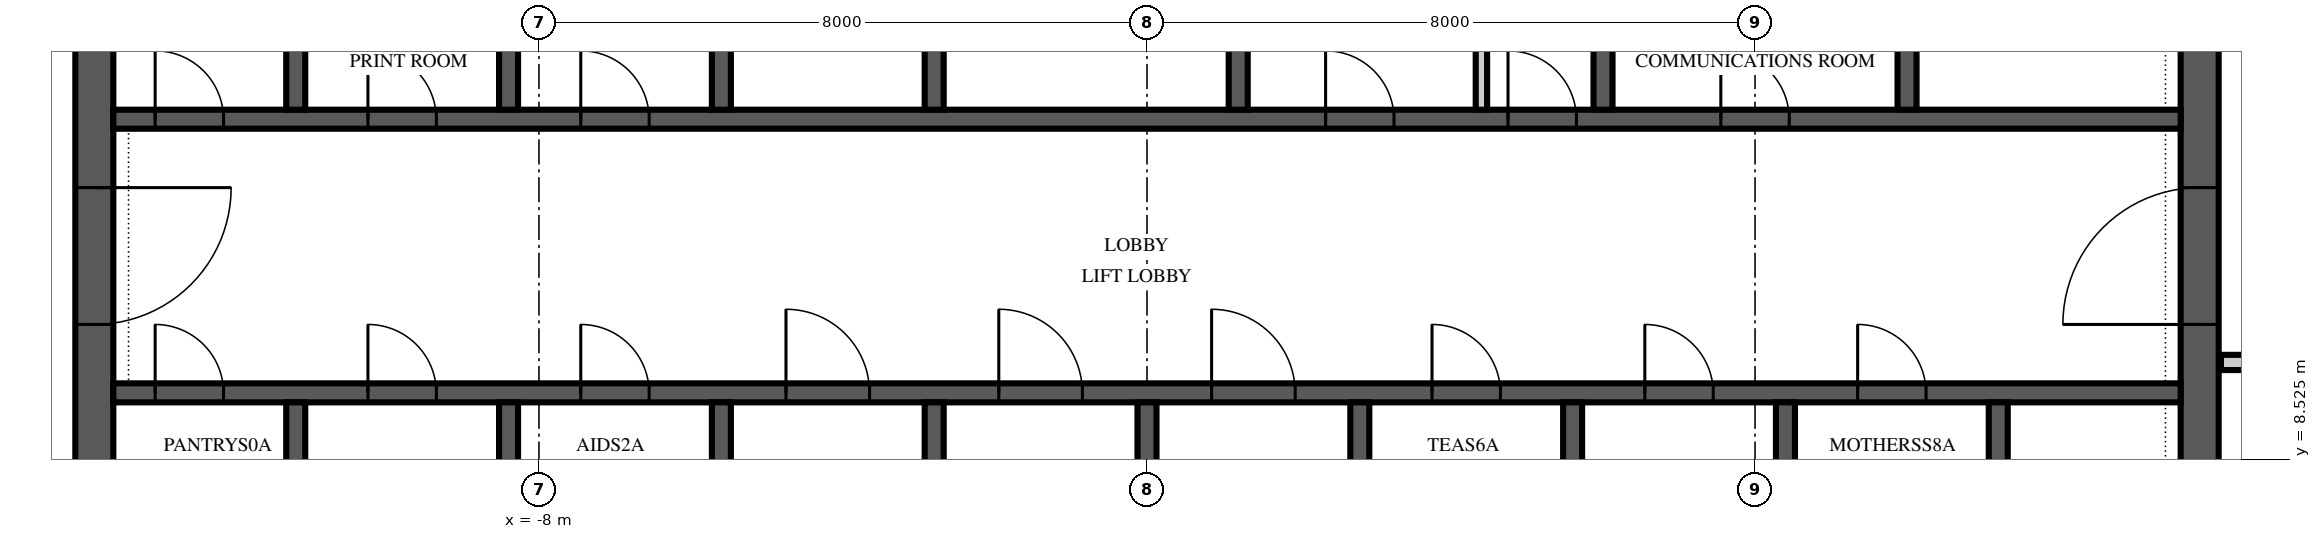
"""IFC4 building model, lengths in metres.
Left out: names, types, materials, properties, quantities, classifications, styles, units other than length and angle.
Written with IfcOpenShell. Run it as: python <this file> out.ifc"""

import sys

from ifc_helpers import new_model, si_unit, direction, frame, frame_2d, origin, place, context, subcontext, project, spatial, polyline, rectangle, outline, extrude, element, fill, save


model = new_model("IFC4")
c1 = context("Model", 3, precision=1e-05, world=origin(), true_north=direction((0.0, 1.0)))
c2 = subcontext(c1, "Body", "Model", "MODEL_VIEW")
j1 = project(units=[si_unit("LENGTHUNIT", "METRE"), si_unit("PLANEANGLEUNIT", "RADIAN")], contexts=[c1])
p1 = place(None, origin())
s1 = spatial("IfcSite", under=j1, at=p1, CompositionType="ELEMENT")
p2 = place(p1, origin())
s2 = spatial("IfcBuilding", under=s1, at=p2, CompositionType="ELEMENT")
p3 = place(p2, frame((0.0, 0.0, 312.0)))
s3 = spatial("IfcBuildingStorey", under=s2, at=p3, CompositionType="ELEMENT", Elevation=312.0)
p4 = place(p3, frame((13.85, 6.15, 0.0), z_axis=(0.0, 0.0, 1.0), x_axis=(0.0, 1.0, 0.0)))
e1 = element("IfcWall", 1, at=p4, inside=s3, PredefinedType="SHEAR", context=c2, shape_type="SweptSolid", body=[
    extrude(outline(polyline([(0.0, -0.25), (17.7, -0.25), (17.7, 0.0), (17.45, 0.0), (17.45, 0.25), (0.25, 0.25), (0.25, 0.0), (0.0, 0.0), (0.0, -0.25)])), origin(), (0.0, 0.0, 1.0), 4.0),
])
p5 = place(p4, frame((4.15, 0.0, 0.0)))
e2 = element("IfcOpeningElement", 2, at=p5, cuts=e1, PredefinedType="OPENING", context=c2, shape_type="SweptSolid", body=[
    extrude(rectangle(XDim=1.8, YDim=2.4, at=frame_2d((0.9, 1.2))), frame((0.0, 0.265, 0.0), z_axis=(0.0, -1.0, 0.0), x_axis=(1.0, 0.0, 0.0)), (0.0, 0.0, 1.0), 0.53),
])
p6 = place(p3, frame((-13.85, 23.85, 0.0), z_axis=(0.0, 0.0, 1.0), x_axis=(0.0, -1.0, 0.0)))
e3 = element("IfcWall", 3, at=p6, inside=s3, PredefinedType="SHEAR", context=c2, shape_type="SweptSolid", body=[
    extrude(outline(polyline([(0.0, -0.25), (17.7, -0.25), (17.7, 0.0), (17.45, 0.0), (17.45, 0.25), (0.25, 0.25), (0.25, 0.0), (0.0, 0.0), (0.0, -0.25)])), origin(), (0.0, 0.0, 1.0), 4.0),
])
p7 = place(p6, frame((11.75, 0.0, 0.0)))
e4 = element("IfcOpeningElement", 4, at=p7, cuts=e3, PredefinedType="OPENING", context=c2, shape_type="SweptSolid", body=[
    extrude(rectangle(XDim=1.8, YDim=2.4, at=frame_2d((0.9, 1.2))), frame((0.0, 0.265, 0.0), z_axis=(0.0, -1.0, 0.0), x_axis=(1.0, 0.0, 0.0)), (0.0, 0.0, 1.0), 0.53),
])
p8 = place(p3, frame((-13.6, 9.4, 0.0), z_axis=(0.0, 0.0, 1.0), x_axis=(1.0, 0.0, 0.0)))
e5 = element("IfcWall", 5, at=p8, inside=s3, PredefinedType="SHEAR", context=c2, shape_type="SweptSolid", body=[
    extrude(rectangle(XDim=27.2, YDim=0.25, at=frame_2d((13.6, 0.0))), origin(), (0.0, 0.0, 1.0), 4.0),
])
p9 = place(p8, frame((8.85, 0.0, 0.0)))
e6 = element("IfcOpeningElement", 6, at=p9, cuts=e5, PredefinedType="OPENING", context=c2, shape_type="SweptSolid", body=[
    extrude(rectangle(XDim=1.1, YDim=2.1, at=frame_2d((0.55, 1.05))), frame((0.0, 0.14, 0.0), z_axis=(0.0, -1.0, 0.0), x_axis=(1.0, 0.0, 0.0)), (0.0, 0.0, 1.0), 0.28),
])
p10 = place(p8, frame((11.65, 0.0, 0.0)))
e7 = element("IfcOpeningElement", 7, at=p10, cuts=e5, PredefinedType="OPENING", context=c2, shape_type="SweptSolid", body=[
    extrude(rectangle(XDim=1.1, YDim=2.1, at=frame_2d((0.55, 1.05))), frame((0.0, 0.14, 0.0), z_axis=(0.0, -1.0, 0.0), x_axis=(1.0, 0.0, 0.0)), (0.0, 0.0, 1.0), 0.28),
])
p11 = place(p8, frame((14.45, 0.0, 0.0)))
e8 = element("IfcOpeningElement", 8, at=p11, cuts=e5, PredefinedType="OPENING", context=c2, shape_type="SweptSolid", body=[
    extrude(rectangle(XDim=1.1, YDim=2.1, at=frame_2d((0.55, 1.05))), frame((0.0, 0.14, 0.0), z_axis=(0.0, -1.0, 0.0), x_axis=(1.0, 0.0, 0.0)), (0.0, 0.0, 1.0), 0.28),
])
p12 = place(p8, frame((0.55, 0.0, 0.0)))
e9 = element("IfcOpeningElement", 9, at=p12, cuts=e5, PredefinedType="OPENING", context=c2, shape_type="SweptSolid", body=[
    extrude(rectangle(XDim=0.9, YDim=2.1, at=frame_2d((0.45, 1.05))), frame((0.0, 0.14, 0.0), z_axis=(0.0, -1.0, 0.0), x_axis=(1.0, 0.0, 0.0)), (0.0, 0.0, 1.0), 0.28),
])
p13 = place(p8, frame((3.35, 0.0, 0.0)))
e10 = element("IfcOpeningElement", 10, at=p13, cuts=e5, PredefinedType="OPENING", context=c2, shape_type="SweptSolid", body=[
    extrude(rectangle(XDim=0.9, YDim=2.1, at=frame_2d((0.45, 1.05))), frame((0.0, 0.14, 0.0), z_axis=(0.0, -1.0, 0.0), x_axis=(1.0, 0.0, 0.0)), (0.0, 0.0, 1.0), 0.28),
])
p14 = place(p8, frame((6.15, 0.0, 0.0)))
e11 = element("IfcOpeningElement", 11, at=p14, cuts=e5, PredefinedType="OPENING", context=c2, shape_type="SweptSolid", body=[
    extrude(rectangle(XDim=0.9, YDim=2.1, at=frame_2d((0.45, 1.05))), frame((0.0, 0.14, 0.0), z_axis=(0.0, -1.0, 0.0), x_axis=(1.0, 0.0, 0.0)), (0.0, 0.0, 1.0), 0.28),
])
p15 = place(p8, frame((17.35, 0.0, 0.0)))
e12 = element("IfcOpeningElement", 12, at=p15, cuts=e5, PredefinedType="OPENING", context=c2, shape_type="SweptSolid", body=[
    extrude(rectangle(XDim=0.9, YDim=2.1, at=frame_2d((0.45, 1.05))), frame((0.0, 0.14, 0.0), z_axis=(0.0, -1.0, 0.0), x_axis=(1.0, 0.0, 0.0)), (0.0, 0.0, 1.0), 0.28),
])
p16 = place(p8, frame((20.15, 0.0, 0.0)))
e13 = element("IfcOpeningElement", 13, at=p16, cuts=e5, PredefinedType="OPENING", context=c2, shape_type="SweptSolid", body=[
    extrude(rectangle(XDim=0.9, YDim=2.1, at=frame_2d((0.45, 1.05))), frame((0.0, 0.14, 0.0), z_axis=(0.0, -1.0, 0.0), x_axis=(1.0, 0.0, 0.0)), (0.0, 0.0, 1.0), 0.28),
])
p17 = place(p8, frame((22.95, 0.0, 0.0)))
e14 = element("IfcOpeningElement", 14, at=p17, cuts=e5, PredefinedType="OPENING", context=c2, shape_type="SweptSolid", body=[
    extrude(rectangle(XDim=0.9, YDim=2.1, at=frame_2d((0.45, 1.05))), frame((0.0, 0.14, 0.0), z_axis=(0.0, -1.0, 0.0), x_axis=(1.0, 0.0, 0.0)), (0.0, 0.0, 1.0), 0.28),
])
p18 = place(p3, frame((-13.6, 13.0, 0.0), z_axis=(0.0, 0.0, 1.0), x_axis=(1.0, 0.0, 0.0)))
e15 = element("IfcWall", 15, at=p18, inside=s3, PredefinedType="SHEAR", context=c2, shape_type="SweptSolid", body=[
    extrude(rectangle(XDim=27.2, YDim=0.25, at=frame_2d((13.6, 0.0))), origin(), (0.0, 0.0, 1.0), 4.0),
])
p19 = place(p18, frame((15.95, 0.0, 0.0)))
e16 = element("IfcOpeningElement", 16, at=p19, cuts=e15, PredefinedType="OPENING", context=c2, shape_type="SweptSolid", body=[
    extrude(rectangle(XDim=0.9, YDim=2.1, at=frame_2d((0.45, 1.05))), frame((0.0, 0.14, 0.0), z_axis=(0.0, -1.0, 0.0), x_axis=(1.0, 0.0, 0.0)), (0.0, 0.0, 1.0), 0.28),
])
p20 = place(p18, frame((18.35, 0.0, 0.0)))
e17 = element("IfcOpeningElement", 17, at=p20, cuts=e15, PredefinedType="OPENING", context=c2, shape_type="SweptSolid", body=[
    extrude(rectangle(XDim=0.9, YDim=2.1, at=frame_2d((0.45, 1.05))), frame((0.0, 0.14, 0.0), z_axis=(0.0, -1.0, 0.0), x_axis=(1.0, 0.0, 0.0)), (0.0, 0.0, 1.0), 0.28),
])
p21 = place(p18, frame((21.15, 0.0, 0.0)))
e18 = element("IfcOpeningElement", 18, at=p21, cuts=e15, PredefinedType="OPENING", context=c2, shape_type="SweptSolid", body=[
    extrude(rectangle(XDim=0.9, YDim=2.1, at=frame_2d((0.45, 1.05))), frame((0.0, 0.14, 0.0), z_axis=(0.0, -1.0, 0.0), x_axis=(1.0, 0.0, 0.0)), (0.0, 0.0, 1.0), 0.28),
])
p22 = place(p18, frame((0.55, 0.0, 0.0)))
e19 = element("IfcOpeningElement", 19, at=p22, cuts=e15, PredefinedType="OPENING", context=c2, shape_type="SweptSolid", body=[
    extrude(rectangle(XDim=0.9, YDim=2.1, at=frame_2d((0.45, 1.05))), frame((0.0, 0.14, 0.0), z_axis=(0.0, -1.0, 0.0), x_axis=(1.0, 0.0, 0.0)), (0.0, 0.0, 1.0), 0.28),
])
p23 = place(p18, frame((3.35, 0.0, 0.0)))
e20 = element("IfcOpeningElement", 20, at=p23, cuts=e15, PredefinedType="OPENING", context=c2, shape_type="SweptSolid", body=[
    extrude(rectangle(XDim=0.9, YDim=2.1, at=frame_2d((0.45, 1.05))), frame((0.0, 0.14, 0.0), z_axis=(0.0, -1.0, 0.0), x_axis=(1.0, 0.0, 0.0)), (0.0, 0.0, 1.0), 0.28),
])
p24 = place(p18, frame((6.15, 0.0, 0.0)))
e21 = element("IfcOpeningElement", 21, at=p24, cuts=e15, PredefinedType="OPENING", context=c2, shape_type="SweptSolid", body=[
    extrude(rectangle(XDim=0.9, YDim=2.1, at=frame_2d((0.45, 1.05))), frame((0.0, 0.14, 0.0), z_axis=(0.0, -1.0, 0.0), x_axis=(1.0, 0.0, 0.0)), (0.0, 0.0, 1.0), 0.28),
])
for number, where, z_axis, x_axis in (
    (22, (-11.2, 6.4, 0.0), (0.0, 0.0, 1.0), (0.0, 1.0, 0.0)),
    (23, (-8.4, 6.4, 0.0), (0.0, 0.0, 1.0), (0.0, 1.0, 0.0)),
    (24, (-5.6, 6.4, 0.0), (0.0, 0.0, 1.0), (0.0, 1.0, 0.0)),
    (25, (-2.8, 6.4, 0.0), (0.0, 0.0, 1.0), (0.0, 1.0, 0.0)),
    (26, (0.0, 6.4, 0.0), (0.0, 0.0, 1.0), (0.0, 1.0, 0.0)),
    (27, (2.8, 6.4, 0.0), (0.0, 0.0, 1.0), (0.0, 1.0, 0.0)),
    (28, (5.6, 6.4, 0.0), (0.0, 0.0, 1.0), (0.0, 1.0, 0.0)),
    (29, (8.4, 6.4, 0.0), (0.0, 0.0, 1.0), (0.0, 1.0, 0.0)),
    (30, (11.2, 6.4, 0.0), (0.0, 0.0, 1.0), (0.0, 1.0, 0.0)),
):
    element("IfcWall", number, at=place(p3, frame(where, z_axis=z_axis, x_axis=x_axis)), inside=s3, PredefinedType="SHEAR", context=c2, shape_type="SweptSolid", body=[
        extrude(rectangle(XDim=2.875, YDim=0.25, at=frame_2d((1.438, 0.0))), origin(), (0.0, 0.0, 1.0), 4.0),
    ])
for number, where, z_axis, x_axis in (
    (31, (-11.2, 13.125, 0.0), (0.0, 0.0, 1.0), (0.0, 1.0, 0.0)),
    (32, (-8.4, 13.125, 0.0), (0.0, 0.0, 1.0), (0.0, 1.0, 0.0)),
    (33, (-5.6, 13.125, 0.0), (0.0, 0.0, 1.0), (0.0, 1.0, 0.0)),
    (34, (-2.8, 13.125, 0.0), (0.0, 0.0, 1.0), (0.0, 1.0, 0.0)),
    (35, (1.2, 13.125, 0.0), (0.0, 0.0, 1.0), (0.0, 1.0, 0.0)),
    (36, (6.0, 13.125, 0.0), (0.0, 0.0, 1.0), (0.0, 1.0, 0.0)),
    (37, (10.0, 13.125, 0.0), (0.0, 0.0, 1.0), (0.0, 1.0, 0.0)),
):
    element("IfcWall", number, at=place(p3, frame(where, z_axis=z_axis, x_axis=x_axis)), inside=s3, PredefinedType="SHEAR", context=c2, shape_type="SweptSolid", body=[
        extrude(rectangle(XDim=2.75, YDim=0.25, at=frame_2d((1.375, 0.0))), origin(), (0.0, 0.0, 1.0), 4.0),
    ])
p25 = place(p3, frame((4.4, 13.125, 0.0), z_axis=(0.0, 0.0, 1.0), x_axis=(0.0, 1.0, 0.0)))
e38 = element("IfcWall", 38, at=p25, inside=s3, PredefinedType="PARTITIONING", context=c2, shape_type="SweptSolid", body=[
    extrude(rectangle(XDim=2.75, YDim=0.15, at=frame_2d((1.375, 0.0))), origin(), (0.0, 0.0, 1.0), 3.85),
])
p26 = place(p3, frame((14.13, 9.8, 0.0), z_axis=(0.0, 0.0, 1.0), x_axis=(1.0, 0.0, 0.0)))
e39 = element("IfcWall", 39, at=p26, inside=s3, PredefinedType="PARTITIONING", context=c2, shape_type="SweptSolid", body=[
    extrude(rectangle(XDim=2.02, YDim=0.2, at=frame_2d((1.01, 0.0))), origin(), (0.0, 0.0, 1.0), 3.85),
])
p27 = place(p5, origin())
e40 = element("IfcDoor", 40, at=p27, inside=s3, OperationType="DOUBLE_DOOR_SINGLE_SWING", PredefinedType="DOOR", context=c2, shape_type="SweptSolid", body=[
    extrude(rectangle(XDim=1.8, YDim=2.4, at=frame_2d((0.9, 1.2))), frame((0.0, 0.25, 0.0), z_axis=(0.0, -1.0, 0.0), x_axis=(1.0, 0.0, 0.0)), (0.0, 0.0, 1.0), 0.5),
])
fill(e2, e40)
p28 = place(p7, origin())
e41 = element("IfcDoor", 41, at=p28, inside=s3, OperationType="DOUBLE_DOOR_SINGLE_SWING", PredefinedType="DOOR", context=c2, shape_type="SweptSolid", body=[
    extrude(rectangle(XDim=1.8, YDim=2.4, at=frame_2d((0.9, 1.2))), frame((0.0, 0.25, 0.0), z_axis=(0.0, -1.0, 0.0), x_axis=(1.0, 0.0, 0.0)), (0.0, 0.0, 1.0), 0.5),
])
fill(e4, e41)
p29 = place(p9, origin())
e42 = element("IfcDoor", 42, at=p29, inside=s3, OperationType="SLIDING_TO_LEFT", PredefinedType="DOOR", context=c2, shape_type="SweptSolid", body=[
    extrude(rectangle(XDim=1.1, YDim=2.1, at=frame_2d((0.55, 1.05))), frame((0.0, 0.125, 0.0), z_axis=(0.0, -1.0, 0.0), x_axis=(1.0, 0.0, 0.0)), (0.0, 0.0, 1.0), 0.25),
])
fill(e6, e42)
p30 = place(p10, origin())
e43 = element("IfcDoor", 43, at=p30, inside=s3, OperationType="SLIDING_TO_LEFT", PredefinedType="DOOR", context=c2, shape_type="SweptSolid", body=[
    extrude(rectangle(XDim=1.1, YDim=2.1, at=frame_2d((0.55, 1.05))), frame((0.0, 0.125, 0.0), z_axis=(0.0, -1.0, 0.0), x_axis=(1.0, 0.0, 0.0)), (0.0, 0.0, 1.0), 0.25),
])
fill(e7, e43)
p31 = place(p11, origin())
e44 = element("IfcDoor", 44, at=p31, inside=s3, OperationType="SLIDING_TO_LEFT", PredefinedType="DOOR", context=c2, shape_type="SweptSolid", body=[
    extrude(rectangle(XDim=1.1, YDim=2.1, at=frame_2d((0.55, 1.05))), frame((0.0, 0.125, 0.0), z_axis=(0.0, -1.0, 0.0), x_axis=(1.0, 0.0, 0.0)), (0.0, 0.0, 1.0), 0.25),
])
fill(e8, e44)
p32 = place(p19, origin())
e45 = element("IfcDoor", 45, at=p32, inside=s3, OperationType="SINGLE_SWING_LEFT", PredefinedType="DOOR", context=c2, shape_type="SweptSolid", body=[
    extrude(rectangle(XDim=0.9, YDim=2.1, at=frame_2d((0.45, 1.05))), frame((0.0, 0.125, 0.0), z_axis=(0.0, -1.0, 0.0), x_axis=(1.0, 0.0, 0.0)), (0.0, 0.0, 1.0), 0.25),
])
fill(e16, e45)
p33 = place(p20, origin())
e46 = element("IfcDoor", 46, at=p33, inside=s3, OperationType="SINGLE_SWING_LEFT", PredefinedType="DOOR", context=c2, shape_type="SweptSolid", body=[
    extrude(rectangle(XDim=0.9, YDim=2.1, at=frame_2d((0.45, 1.05))), frame((0.0, 0.125, 0.0), z_axis=(0.0, -1.0, 0.0), x_axis=(1.0, 0.0, 0.0)), (0.0, 0.0, 1.0), 0.25),
])
fill(e17, e46)
p34 = place(p21, origin())
e47 = element("IfcDoor", 47, at=p34, inside=s3, OperationType="SINGLE_SWING_LEFT", PredefinedType="DOOR", context=c2, shape_type="SweptSolid", body=[
    extrude(rectangle(XDim=0.9, YDim=2.1, at=frame_2d((0.45, 1.05))), frame((0.0, 0.125, 0.0), z_axis=(0.0, -1.0, 0.0), x_axis=(1.0, 0.0, 0.0)), (0.0, 0.0, 1.0), 0.25),
])
fill(e18, e47)
p35 = place(p22, origin())
e48 = element("IfcDoor", 48, at=p35, inside=s3, OperationType="SINGLE_SWING_LEFT", PredefinedType="DOOR", context=c2, shape_type="SweptSolid", body=[
    extrude(rectangle(XDim=0.9, YDim=2.1, at=frame_2d((0.45, 1.05))), frame((0.0, 0.125, 0.0), z_axis=(0.0, -1.0, 0.0), x_axis=(1.0, 0.0, 0.0)), (0.0, 0.0, 1.0), 0.25),
])
fill(e19, e48)
p36 = place(p23, origin())
e49 = element("IfcDoor", 49, at=p36, inside=s3, OperationType="SINGLE_SWING_LEFT", PredefinedType="DOOR", context=c2, shape_type="SweptSolid", body=[
    extrude(rectangle(XDim=0.9, YDim=2.1, at=frame_2d((0.45, 1.05))), frame((0.0, 0.125, 0.0), z_axis=(0.0, -1.0, 0.0), x_axis=(1.0, 0.0, 0.0)), (0.0, 0.0, 1.0), 0.25),
])
fill(e20, e49)
p37 = place(p24, origin())
e50 = element("IfcDoor", 50, at=p37, inside=s3, OperationType="SINGLE_SWING_LEFT", PredefinedType="DOOR", context=c2, shape_type="SweptSolid", body=[
    extrude(rectangle(XDim=0.9, YDim=2.1, at=frame_2d((0.45, 1.05))), frame((0.0, 0.125, 0.0), z_axis=(0.0, -1.0, 0.0), x_axis=(1.0, 0.0, 0.0)), (0.0, 0.0, 1.0), 0.25),
])
fill(e21, e50)
p38 = place(p12, origin())
e51 = element("IfcDoor", 51, at=p38, inside=s3, OperationType="SINGLE_SWING_LEFT", PredefinedType="DOOR", context=c2, shape_type="SweptSolid", body=[
    extrude(rectangle(XDim=0.9, YDim=2.1, at=frame_2d((0.45, 1.05))), frame((0.0, 0.125, 0.0), z_axis=(0.0, -1.0, 0.0), x_axis=(1.0, 0.0, 0.0)), (0.0, 0.0, 1.0), 0.25),
])
fill(e9, e51)
p39 = place(p13, origin())
e52 = element("IfcDoor", 52, at=p39, inside=s3, OperationType="SINGLE_SWING_LEFT", PredefinedType="DOOR", context=c2, shape_type="SweptSolid", body=[
    extrude(rectangle(XDim=0.9, YDim=2.1, at=frame_2d((0.45, 1.05))), frame((0.0, 0.125, 0.0), z_axis=(0.0, -1.0, 0.0), x_axis=(1.0, 0.0, 0.0)), (0.0, 0.0, 1.0), 0.25),
])
fill(e10, e52)
p40 = place(p14, origin())
e53 = element("IfcDoor", 53, at=p40, inside=s3, OperationType="SINGLE_SWING_LEFT", PredefinedType="DOOR", context=c2, shape_type="SweptSolid", body=[
    extrude(rectangle(XDim=0.9, YDim=2.1, at=frame_2d((0.45, 1.05))), frame((0.0, 0.125, 0.0), z_axis=(0.0, -1.0, 0.0), x_axis=(1.0, 0.0, 0.0)), (0.0, 0.0, 1.0), 0.25),
])
fill(e11, e53)
p41 = place(p15, origin())
e54 = element("IfcDoor", 54, at=p41, inside=s3, OperationType="SINGLE_SWING_LEFT", PredefinedType="DOOR", context=c2, shape_type="SweptSolid", body=[
    extrude(rectangle(XDim=0.9, YDim=2.1, at=frame_2d((0.45, 1.05))), frame((0.0, 0.125, 0.0), z_axis=(0.0, -1.0, 0.0), x_axis=(1.0, 0.0, 0.0)), (0.0, 0.0, 1.0), 0.25),
])
fill(e12, e54)
p42 = place(p16, origin())
e55 = element("IfcDoor", 55, at=p42, inside=s3, OperationType="SINGLE_SWING_LEFT", PredefinedType="DOOR", context=c2, shape_type="SweptSolid", body=[
    extrude(rectangle(XDim=0.9, YDim=2.1, at=frame_2d((0.45, 1.05))), frame((0.0, 0.125, 0.0), z_axis=(0.0, -1.0, 0.0), x_axis=(1.0, 0.0, 0.0)), (0.0, 0.0, 1.0), 0.25),
])
fill(e13, e55)
p43 = place(p17, origin())
e56 = element("IfcDoor", 56, at=p43, inside=s3, OperationType="SINGLE_SWING_LEFT", PredefinedType="DOOR", context=c2, shape_type="SweptSolid", body=[
    extrude(rectangle(XDim=0.9, YDim=2.1, at=frame_2d((0.45, 1.05))), frame((0.0, 0.125, 0.0), z_axis=(0.0, -1.0, 0.0), x_axis=(1.0, 0.0, 0.0)), (0.0, 0.0, 1.0), 0.25),
])
fill(e14, e56)
save(model, sys.argv[1])
